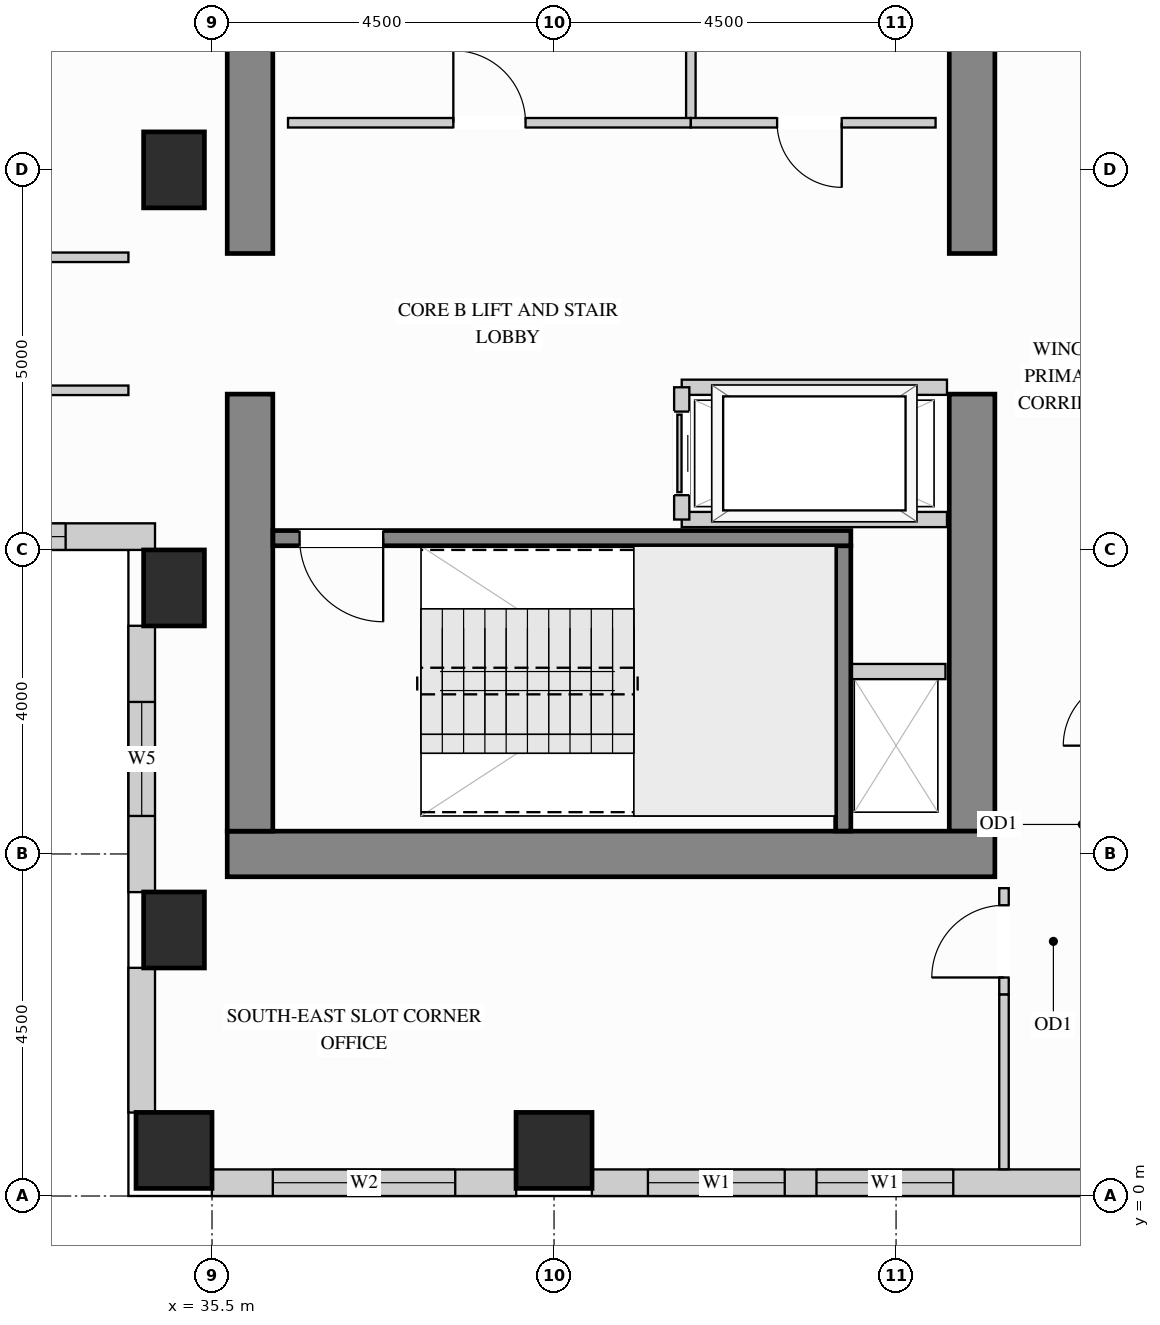
"""IFC4 building model, lengths in metres.
Left out: names, types, materials, properties, quantities, classifications, styles, units other than length and angle.
Written with IfcOpenShell. Run it as: python <this file> out.ifc"""

import sys

from ifc_helpers import new_model, si_unit, direction, frame, frame_2d, origin, origin_2d, place, context, subcontext, project, spatial, rectangle, extrude, source, transform, mapped, element, fill, save


model = new_model("IFC4")
c1 = context("Model", 3, precision=1e-05, world=origin(), true_north=direction((0.0, 1.0)))
c2 = subcontext(c1, "Body", "Model", "MODEL_VIEW")
j1 = project(units=[si_unit("LENGTHUNIT", "METRE"), si_unit("PLANEANGLEUNIT", "RADIAN")], contexts=[c1])
p1 = place(None, origin())
s1 = spatial("IfcSite", under=j1, at=p1, CompositionType="ELEMENT")
p2 = place(p1, origin())
s2 = spatial("IfcBuilding", under=s1, at=p2, CompositionType="ELEMENT")
p3 = place(p2, frame((0.0, 0.0, 197.1)))
s3 = spatial("IfcBuildingStorey", under=s2, at=p3, CompositionType="ELEMENT", Elevation=197.1)
m1 = source(origin(), c2, "Body", "SweptSolid", [
    extrude(rectangle(XDim=0.8, YDim=1.0, at=origin_2d()), origin(), (0.0, 0.0, 1.0), 3.4),
])
for number, where, z_axis, x_axis in (
    (1, (35.0, 13.5, 0.0), (0.0, 0.0, 1.0), (1.0, 0.0, 0.0)),
    (2, (35.0, 3.5, 0.0), (0.0, 0.0, 1.0), (1.0, 0.0, 0.0)),
    (3, (35.0, 8.0, 0.0), (0.0, 0.0, 1.0), (1.0, 0.0, 0.0)),
):
    element("IfcColumn", number, at=place(p3, frame(where, z_axis=z_axis, x_axis=x_axis)), inside=s3, PredefinedType="COLUMN", context=c2, shape_type="MappedRepresentation", body=[
        mapped(m1, transform((0.0, 0.0, 0.0), x_axis=(1.0, 0.0, 0.0), y_axis=(0.0, 1.0, 0.0), z_axis=(0.0, 0.0, 1.0))),
    ])
m2 = source(origin(), c2, "Body", "SweptSolid", [
    extrude(rectangle(XDim=1.0, YDim=1.0, at=origin_2d()), origin(), (0.0, 0.0, 1.0), 3.4),
])
for number, where, z_axis, x_axis in (
    (4, (35.0, 0.6, 0.0), (0.0, 0.0, 1.0), (1.0, 0.0, 0.0)),
    (5, (40.0, 0.6, 0.0), (0.0, 0.0, 1.0), (1.0, 0.0, 0.0)),
):
    element("IfcColumn", number, at=place(p3, frame(where, z_axis=z_axis, x_axis=x_axis)), inside=s3, PredefinedType="COLUMN", context=c2, shape_type="MappedRepresentation", body=[
        mapped(m2, transform((0.0, 0.0, 0.0), x_axis=(1.0, 0.0, 0.0), y_axis=(0.0, 1.0, 0.0), z_axis=(0.0, 0.0, 1.0))),
    ])
m3 = source(origin(), c2, "Body", "SweptSolid", [
    extrude(rectangle(XDim=5.75, YDim=0.6, at=frame_2d((2.875, 0.0))), origin(), (0.0, 0.0, 1.0), 3.4),
])
p4 = place(p3, frame((45.5, 4.8, 0.0), z_axis=(0.0, 0.0, 1.0), x_axis=(0.0, 1.0, 0.0)))
e6 = element("IfcWall", 6, at=p4, inside=s3, PredefinedType="SHEAR", context=c2, shape_type="MappedRepresentation", body=[
    mapped(m3, transform((0.0, 0.0, 0.0), x_axis=(1.0, 0.0, 0.0), y_axis=(0.0, 1.0, 0.0), z_axis=(0.0, 0.0, 1.0))),
])
m4 = source(origin(), c2, "Body", "SweptSolid", [
    extrude(rectangle(XDim=3.8, YDim=0.6, at=frame_2d((1.9, 0.0))), origin(), (0.0, 0.0, 1.0), 3.4),
])
p5 = place(p3, frame((45.5, 12.4, 0.0), z_axis=(0.0, 0.0, 1.0), x_axis=(0.0, 1.0, 0.0)))
e7 = element("IfcWall", 7, at=p5, inside=s3, PredefinedType="SHEAR", context=c2, shape_type="MappedRepresentation", body=[
    mapped(m4, transform((0.0, 0.0, 0.0), x_axis=(1.0, 0.0, 0.0), y_axis=(0.0, 1.0, 0.0), z_axis=(0.0, 0.0, 1.0))),
])
m5 = source(origin(), c2, "Body", "SweptSolid", [
    extrude(rectangle(XDim=10.1, YDim=0.6, at=frame_2d((5.05, 0.0))), origin(), (0.0, 0.0, 1.0), 3.4),
])
p6 = place(p3, frame((35.7, 4.5, 0.0), z_axis=(0.0, 0.0, 1.0), x_axis=(1.0, 0.0, 0.0)))
e8 = element("IfcWall", 8, at=p6, inside=s3, PredefinedType="SHEAR", context=c2, shape_type="MappedRepresentation", body=[
    mapped(m5, transform((0.0, 0.0, 0.0), x_axis=(1.0, 0.0, 0.0), y_axis=(0.0, 1.0, 0.0), z_axis=(0.0, 0.0, 1.0))),
])
p7 = place(p3, frame((36.0, 4.8, 0.0), z_axis=(0.0, 0.0, 1.0), x_axis=(0.0, 1.0, 0.0)))
e9 = element("IfcWall", 9, at=p7, inside=s3, PredefinedType="SHEAR", context=c2, shape_type="MappedRepresentation", body=[
    mapped(m3, transform((0.0, 0.0, 0.0), x_axis=(1.0, 0.0, 0.0), y_axis=(0.0, 1.0, 0.0), z_axis=(0.0, 0.0, 1.0))),
])
p8 = place(p3, frame((36.0, 12.4, 0.0), z_axis=(0.0, 0.0, 1.0), x_axis=(0.0, 1.0, 0.0)))
e10 = element("IfcWall", 10, at=p8, inside=s3, PredefinedType="SHEAR", context=c2, shape_type="MappedRepresentation", body=[
    mapped(m4, transform((0.0, 0.0, 0.0), x_axis=(1.0, 0.0, 0.0), y_axis=(0.0, 1.0, 0.0), z_axis=(0.0, 0.0, 1.0))),
])
p9 = place(p3, frame((30.898, 8.675, 0.0), z_axis=(0.0, 0.0, 1.0), x_axis=(1.0, 0.0, 0.0)))
e11 = element("IfcWall", 11, at=p9, inside=s3, PredefinedType="SOLIDWALL", context=c2, shape_type="SweptSolid", body=[
    extrude(rectangle(XDim=3.852, YDim=0.35, at=frame_2d((1.926, 0.0))), origin(), (0.0, 0.0, 1.0), 3.385),
])
p10 = place(p9, frame((1.176, 0.0, 0.78)))
e12 = element("IfcOpeningElement", 12, at=p10, cuts=e11, PredefinedType="OPENING", context=c2, shape_type="SweptSolid", body=[
    extrude(rectangle(XDim=1.5, YDim=2.0, at=frame_2d((0.75, 1.0))), frame((0.0, 0.185, 0.0), z_axis=(0.0, -1.0, 0.0), x_axis=(1.0, 0.0, 0.0)), (0.0, 0.0, 1.0), 0.37),
])
p11 = place(p3, frame((34.575, 7.502, 0.0), z_axis=(0.0, 0.0, 1.0), x_axis=(0.0, -1.0, 0.0)))
e13 = element("IfcWall", 13, at=p11, inside=s3, PredefinedType="SOLIDWALL", context=c2, shape_type="SweptSolid", body=[
    extrude(rectangle(XDim=3.504, YDim=0.35, at=frame_2d((1.752, 0.0))), origin(), (0.0, 0.0, 1.0), 2.612),
])
p12 = place(p11, frame((1.002, 0.0, 0.78)))
e14 = element("IfcOpeningElement", 14, at=p12, cuts=e13, PredefinedType="OPENING", context=c2, shape_type="SweptSolid", body=[
    extrude(rectangle(XDim=1.5, YDim=1.652, at=frame_2d((0.75, 0.826))), frame((0.0, 0.185, 0.0), z_axis=(0.0, -1.0, 0.0), x_axis=(1.0, 0.0, 0.0)), (0.0, 0.0, 1.0), 0.37),
])
m6 = source(origin(), c2, "Body", "SweptSolid", [
    extrude(rectangle(XDim=1.904, YDim=0.35, at=frame_2d((0.952, 0.0))), origin(), (0.0, 0.0, 1.0), 2.612),
])
p13 = place(p3, frame((34.575, 3.002, 0.0), z_axis=(0.0, 0.0, 1.0), x_axis=(0.0, -1.0, 0.0)))
e15 = element("IfcWall", 15, at=p13, inside=s3, PredefinedType="SOLIDWALL", context=c2, shape_type="MappedRepresentation", body=[
    mapped(m6, transform((0.0, 0.0, 0.0), x_axis=(1.0, 0.0, 0.0), y_axis=(0.0, 1.0, 0.0), z_axis=(0.0, 0.0, 1.0))),
])
p14 = place(p3, frame((35.498, 0.175, 0.0), z_axis=(0.0, 0.0, 1.0), x_axis=(1.0, 0.0, 0.0)))
e16 = element("IfcWall", 16, at=p14, inside=s3, PredefinedType="SOLIDWALL", context=c2, shape_type="SweptSolid", body=[
    extrude(rectangle(XDim=4.004, YDim=0.35, at=frame_2d((2.002, 0.0))), origin(), (0.0, 0.0, 1.0), 2.612),
])
p15 = place(p14, frame((0.802, 0.0, 0.78)))
e17 = element("IfcOpeningElement", 17, at=p15, cuts=e16, PredefinedType="OPENING", context=c2, shape_type="SweptSolid", body=[
    extrude(rectangle(XDim=2.4, YDim=1.652, at=frame_2d((1.2, 0.826))), frame((0.0, 0.185, 0.0), z_axis=(0.0, -1.0, 0.0), x_axis=(1.0, 0.0, 0.0)), (0.0, 0.0, 1.0), 0.37),
])
p16 = place(p3, frame((40.498, 0.175, 0.0), z_axis=(0.0, 0.0, 1.0), x_axis=(1.0, 0.0, 0.0)))
e18 = element("IfcWall", 18, at=p16, inside=s3, PredefinedType="SOLIDWALL", context=c2, shape_type="SweptSolid", body=[
    extrude(rectangle(XDim=6.604, YDim=0.35, at=frame_2d((3.302, 0.0))), origin(), (0.0, 0.0, 1.0), 2.612),
])
p17 = place(p16, frame((0.737, 0.0, 0.78)))
e19 = element("IfcOpeningElement", 19, at=p17, cuts=e18, PredefinedType="OPENING", context=c2, shape_type="SweptSolid", body=[
    extrude(rectangle(XDim=1.8, YDim=1.652, at=frame_2d((0.9, 0.826))), frame((0.0, 0.185, 0.0), z_axis=(0.0, -1.0, 0.0), x_axis=(1.0, 0.0, 0.0)), (0.0, 0.0, 1.0), 0.37),
])
p18 = place(p16, frame((2.955, 0.0, 0.78)))
e20 = element("IfcOpeningElement", 20, at=p18, cuts=e18, PredefinedType="OPENING", context=c2, shape_type="SweptSolid", body=[
    extrude(rectangle(XDim=1.8, YDim=1.652, at=frame_2d((0.9, 0.826))), frame((0.0, 0.185, 0.0), z_axis=(0.0, -1.0, 0.0), x_axis=(1.0, 0.0, 0.0)), (0.0, 0.0, 1.0), 0.37),
])
m7 = source(origin(), c2, "Body", "SweptSolid", [
    extrude(rectangle(XDim=1.93, YDim=0.125, at=frame_2d((0.965, 0.0))), origin(), (0.0, 0.0, 1.0), 3.385),
])
p19 = place(p3, frame((41.8, 14.12, 0.0), z_axis=(0.0, 0.0, 1.0), x_axis=(0.0, 1.0, 0.0)))
e21 = element("IfcWall", 21, at=p19, inside=s3, PredefinedType="PARTITIONING", context=c2, shape_type="MappedRepresentation", body=[
    mapped(m7, transform((0.0, 0.0, 0.0), x_axis=(1.0, 0.0, 0.0), y_axis=(0.0, 1.0, 0.0), z_axis=(0.0, 0.0, 1.0))),
])
p20 = place(p3, frame((36.5, 14.12, 0.0), z_axis=(0.0, 0.0, 1.0), x_axis=(1.0, 0.0, 0.0)))
e22 = element("IfcWall", 22, at=p20, inside=s3, PredefinedType="PARTITIONING", context=c2, shape_type="SweptSolid", body=[
    extrude(rectangle(XDim=5.3, YDim=0.125, at=frame_2d((2.65, 0.0))), origin(), (0.0, 0.0, 1.0), 3.385),
])
p21 = place(p20, frame((2.175, 0.0, 0.0)))
e23 = element("IfcOpeningElement", 23, at=p21, cuts=e22, PredefinedType="OPENING", context=c2, shape_type="SweptSolid", body=[
    extrude(rectangle(XDim=0.95, YDim=2.15, at=frame_2d((0.475, 1.075))), frame((0.0, 0.073, 0.0), z_axis=(0.0, -1.0, 0.0), x_axis=(1.0, 0.0, 0.0)), (0.0, 0.0, 1.0), 0.145),
])
p22 = place(p3, frame((41.8, 14.12, 0.0), z_axis=(0.0, 0.0, 1.0), x_axis=(1.0, 0.0, 0.0)))
e24 = element("IfcWall", 24, at=p22, inside=s3, PredefinedType="PARTITIONING", context=c2, shape_type="SweptSolid", body=[
    extrude(rectangle(XDim=3.22, YDim=0.125, at=frame_2d((1.61, 0.0))), origin(), (0.0, 0.0, 1.0), 3.385),
])
p23 = place(p22, frame((1.135, 0.0, 0.0)))
e25 = element("IfcOpeningElement", 25, at=p23, cuts=e24, PredefinedType="OPENING", context=c2, shape_type="SweptSolid", body=[
    extrude(rectangle(XDim=0.85, YDim=2.1, at=frame_2d((0.425, 1.05))), frame((0.0, 0.073, 0.0), z_axis=(0.0, -1.0, 0.0), x_axis=(1.0, 0.0, 0.0)), (0.0, 0.0, 1.0), 0.145),
])
p24 = place(p3, frame((45.92, 2.65, 0.0), z_axis=(0.0, 0.0, 1.0), x_axis=(0.0, 1.0, 0.0)))
e26 = element("IfcWall", 26, at=p24, inside=s3, PredefinedType="PARTITIONING", context=c2, shape_type="SweptSolid", body=[
    extrude(rectangle(XDim=1.4, YDim=0.125, at=frame_2d((0.7, 0.0))), origin(), (0.0, 0.0, 1.0), 3.385),
])
p25 = place(p24, frame((0.225, 0.0, 0.0)))
e27 = element("IfcOpeningElement", 27, at=p25, cuts=e26, PredefinedType="OPENING", context=c2, shape_type="SweptSolid", body=[
    extrude(rectangle(XDim=0.95, YDim=2.15, at=frame_2d((0.475, 1.075))), frame((0.0, 0.073, 0.0), z_axis=(0.0, -1.0, 0.0), x_axis=(1.0, 0.0, 0.0)), (0.0, 0.0, 1.0), 0.145),
])
m8 = source(origin(), c2, "Body", "SweptSolid", [
    extrude(rectangle(XDim=2.298, YDim=0.125, at=frame_2d((1.149, 0.0))), origin(), (0.0, 0.0, 1.0), 3.385),
])
p26 = place(p3, frame((45.92, 0.352, 0.0), z_axis=(0.0, 0.0, 1.0), x_axis=(0.0, 1.0, 0.0)))
e28 = element("IfcWall", 28, at=p26, inside=s3, PredefinedType="PARTITIONING", context=c2, shape_type="MappedRepresentation", body=[
    mapped(m8, transform((0.0, 0.0, 0.0), x_axis=(1.0, 0.0, 0.0), y_axis=(0.0, 1.0, 0.0), z_axis=(0.0, 0.0, 1.0))),
])
p27 = place(p3, frame((29.85, 12.35, 0.0), z_axis=(0.0, 0.0, 1.0), x_axis=(1.0, 0.0, 0.0)))
e29 = element("IfcWall", 29, at=p27, inside=s3, PredefinedType="PARTITIONING", context=c2, shape_type="SweptSolid", body=[
    extrude(rectangle(XDim=4.55, YDim=0.125, at=frame_2d((2.275, 0.0))), origin(), (0.0, 0.0, 1.0), 3.385),
])
p28 = place(p27, frame((1.8, 0.0, 0.0)))
e30 = element("IfcOpeningElement", 30, at=p28, cuts=e29, PredefinedType="OPENING", context=c2, shape_type="SweptSolid", body=[
    extrude(rectangle(XDim=0.95, YDim=2.15, at=frame_2d((0.475, 1.075))), frame((0.0, 0.073, 0.0), z_axis=(0.0, -1.0, 0.0), x_axis=(1.0, 0.0, 0.0)), (0.0, 0.0, 1.0), 0.145),
])
p29 = place(p3, frame((26.95, 10.6, 0.0), z_axis=(0.0, 0.0, 1.0), x_axis=(1.0, 0.0, 0.0)))
e31 = element("IfcWall", 31, at=p29, inside=s3, PredefinedType="PARTITIONING", context=c2, shape_type="SweptSolid", body=[
    extrude(rectangle(XDim=7.45, YDim=0.125, at=frame_2d((3.725, 0.0))), origin(), (0.0, 0.0, 1.0), 3.385),
])
p30 = place(p29, frame((4.478, 0.0, 0.0)))
e32 = element("IfcOpeningElement", 32, at=p30, cuts=e31, PredefinedType="OPENING", context=c2, shape_type="SweptSolid", body=[
    extrude(rectangle(XDim=0.95, YDim=2.15, at=frame_2d((0.475, 1.075))), frame((0.0, 0.073, 0.0), z_axis=(0.0, -1.0, 0.0), x_axis=(1.0, 0.0, 0.0)), (0.0, 0.0, 1.0), 0.145),
])
m9 = source(origin(), c2, "Body", "SweptSolid", [
    extrude(rectangle(XDim=1.3, YDim=0.2, at=frame_2d((0.65, 0.0))), origin(), (0.0, 0.0, 1.0), 3.385),
])
p31 = place(p3, frame((43.85, 6.9, 0.0), z_axis=(0.0, 0.0, 1.0), x_axis=(1.0, 0.0, 0.0)))
e33 = element("IfcWall", 33, at=p31, inside=s3, PredefinedType="PARTITIONING", context=c2, shape_type="MappedRepresentation", body=[
    mapped(m9, transform((0.0, 0.0, 0.0), x_axis=(1.0, 0.0, 0.0), y_axis=(0.0, 1.0, 0.0), z_axis=(0.0, 0.0, 1.0))),
])
m10 = source(origin(), c2, "Body", "SweptSolid", [
    extrude(rectangle(XDim=3.49, YDim=0.2, at=frame_2d((1.745, 0.0))), origin(), (0.0, 0.0, 1.0), 3.385),
])
for number, where, z_axis, x_axis in (
    (34, (41.68, 10.64, 0.0), (0.0, 0.0, 1.0), (1.0, 0.0, 0.0)),
    (35, (41.68, 8.9, 0.0), (0.0, 0.0, 1.0), (1.0, 0.0, 0.0)),
):
    element("IfcWall", number, at=place(p3, frame(where, z_axis=z_axis, x_axis=x_axis)), inside=s3, PredefinedType="PARTITIONING", context=c2, shape_type="MappedRepresentation", body=[
        mapped(m10, transform((0.0, 0.0, 0.0), x_axis=(1.0, 0.0, 0.0), y_axis=(0.0, 1.0, 0.0), z_axis=(0.0, 0.0, 1.0))),
    ])
p32 = place(p3, frame((41.68, 8.9, 0.0), z_axis=(0.0, 0.0, 1.0), x_axis=(0.0, 1.0, 0.0)))
e36 = element("IfcWall", 36, at=p32, inside=s3, PredefinedType="PARTITIONING", context=c2, shape_type="SweptSolid", body=[
    extrude(rectangle(XDim=1.74, YDim=0.2, at=frame_2d((0.87, 0.0))), origin(), (0.0, 0.0, 1.0), 3.385),
])
p33 = place(p32, frame((0.32, 0.0, 0.0)))
e37 = element("IfcOpeningElement", 37, at=p33, cuts=e36, PredefinedType="OPENING", context=c2, shape_type="SweptSolid", body=[
    extrude(rectangle(XDim=1.1, YDim=2.2, at=frame_2d((0.55, 1.1))), frame((0.0, 0.11, 0.0), z_axis=(0.0, -1.0, 0.0), x_axis=(1.0, 0.0, 0.0)), (0.0, 0.0, 1.0), 0.22),
])
m11 = source(origin(), c2, "Body", "SweptSolid", [
    extrude(rectangle(XDim=3.753, YDim=0.2, at=frame_2d((1.876, 0.0))), origin(), (0.0, 0.0, 1.0), 3.4),
])
p34 = place(p3, frame((43.805, 4.802, 0.0), z_axis=(0.0, 0.0, 1.0), x_axis=(0.0, 1.0, 0.0)))
e38 = element("IfcWall", 38, at=p34, inside=s3, PredefinedType="SHEAR", context=c2, shape_type="MappedRepresentation", body=[
    mapped(m11, transform((0.0, 0.0, 0.0), x_axis=(1.0, 0.0, 0.0), y_axis=(0.0, 1.0, 0.0), z_axis=(0.0, 0.0, 1.0))),
])
p35 = place(p3, frame((36.302, 8.655, 0.0), z_axis=(0.0, 0.0, 1.0), x_axis=(1.0, 0.0, 0.0)))
e39 = element("IfcWall", 39, at=p35, inside=s3, PredefinedType="SHEAR", context=c2, shape_type="SweptSolid", body=[
    extrude(rectangle(XDim=7.603, YDim=0.2, at=frame_2d((3.802, 0.0))), origin(), (0.0, 0.0, 1.0), 3.4),
])
p36 = place(p35, frame((0.35, 0.0, 0.0)))
e40 = element("IfcOpeningElement", 40, at=p36, cuts=e39, PredefinedType="OPENING", context=c2, shape_type="SweptSolid", body=[
    extrude(rectangle(XDim=1.1, YDim=2.15, at=frame_2d((0.55, 1.075))), frame((0.0, 0.11, 0.0), z_axis=(0.0, -1.0, 0.0), x_axis=(1.0, 0.0, 0.0)), (0.0, 0.0, 1.0), 0.22),
])
m12 = source(origin(), c2, "Body", "SweptSolid", [
    extrude(rectangle(XDim=1.1, YDim=2.2, at=frame_2d((0.55, 1.1))), frame((0.0, 0.025, 0.0), z_axis=(0.0, -1.0, 0.0), x_axis=(1.0, 0.0, 0.0)), (0.0, 0.0, 1.0), 0.05),
])
p37 = place(p33, origin())
e41 = element("IfcDoor", 41, at=p37, inside=s3, OperationType="SLIDING_TO_LEFT", PredefinedType="DOOR", context=c2, shape_type="MappedRepresentation", body=[
    mapped(m12, transform((0.0, 0.0, 0.0), x_axis=(1.0, 0.0, 0.0), y_axis=(0.0, 1.0, 0.0), z_axis=(0.0, 0.0, 1.0))),
])
fill(e37, e41)
m13 = source(origin(), c2, "Body", "SweptSolid", [
    extrude(rectangle(XDim=0.95, YDim=2.15, at=frame_2d((0.475, 1.075))), frame((0.0, 0.025, 0.0), z_axis=(0.0, -1.0, 0.0), x_axis=(1.0, 0.0, 0.0)), (0.0, 0.0, 1.0), 0.05),
])
p38 = place(p21, origin())
e42 = element("IfcDoor", 42, at=p38, inside=s3, OperationType="SINGLE_SWING_LEFT", PredefinedType="DOOR", context=c2, shape_type="MappedRepresentation", body=[
    mapped(m13, transform((0.0, 0.0, 0.0), x_axis=(1.0, 0.0, 0.0), y_axis=(0.0, 1.0, 0.0), z_axis=(0.0, 0.0, 1.0))),
])
fill(e23, e42)
p39 = place(p25, origin())
e43 = element("IfcDoor", 43, at=p39, inside=s3, OperationType="SINGLE_SWING_LEFT", PredefinedType="DOOR", context=c2, shape_type="MappedRepresentation", body=[
    mapped(m13, transform((0.0, 0.0, 0.0), x_axis=(1.0, 0.0, 0.0), y_axis=(0.0, 1.0, 0.0), z_axis=(0.0, 0.0, 1.0))),
])
fill(e27, e43)
m14 = source(origin(), c2, "Body", "SweptSolid", [
    extrude(rectangle(XDim=0.85, YDim=2.1, at=frame_2d((0.425, 1.05))), frame((0.0, 0.025, 0.0), z_axis=(0.0, -1.0, 0.0), x_axis=(1.0, 0.0, 0.0)), (0.0, 0.0, 1.0), 0.05),
])
p40 = place(p23, origin())
e44 = element("IfcDoor", 44, at=p40, inside=s3, OperationType="SINGLE_SWING_RIGHT", PredefinedType="DOOR", context=c2, shape_type="MappedRepresentation", body=[
    mapped(m14, transform((0.0, 0.0, 0.0), x_axis=(1.0, 0.0, 0.0), y_axis=(0.0, 1.0, 0.0), z_axis=(0.0, 0.0, 1.0))),
])
fill(e25, e44)
m15 = source(origin(), c2, "Body", "SweptSolid", [
    extrude(rectangle(XDim=1.1, YDim=2.15, at=frame_2d((0.55, 1.075))), frame((0.0, 0.025, 0.0), z_axis=(0.0, -1.0, 0.0), x_axis=(1.0, 0.0, 0.0)), (0.0, 0.0, 1.0), 0.05),
])
p41 = place(p36, origin())
e45 = element("IfcDoor", 45, at=p41, inside=s3, OperationType="SINGLE_SWING_RIGHT", PredefinedType="DOOR", context=c2, shape_type="MappedRepresentation", body=[
    mapped(m15, transform((0.0, 0.0, 0.0), x_axis=(1.0, 0.0, 0.0), y_axis=(0.0, 1.0, 0.0), z_axis=(0.0, 0.0, 1.0))),
])
fill(e40, e45)
m16 = source(origin(), c2, "Body", "SweptSolid", [
    extrude(rectangle(XDim=1.8, YDim=1.652, at=frame_2d((0.9, 0.826))), frame((0.0, 0.03, 0.0), z_axis=(0.0, -1.0, 0.0), x_axis=(1.0, 0.0, 0.0)), (0.0, 0.0, 1.0), 0.06),
])
p42 = place(p17, origin())
e46 = element("IfcWindow", 46, at=p42, inside=s3, PartitioningType="SINGLE_PANEL", PredefinedType="WINDOW", context=c2, shape_type="MappedRepresentation", body=[
    mapped(m16, transform((0.0, 0.0, 0.0), x_axis=(1.0, 0.0, 0.0), y_axis=(0.0, 1.0, 0.0), z_axis=(0.0, 0.0, 1.0))),
])
fill(e19, e46)
p43 = place(p18, origin())
e47 = element("IfcWindow", 47, at=p43, inside=s3, PartitioningType="SINGLE_PANEL", PredefinedType="WINDOW", context=c2, shape_type="MappedRepresentation", body=[
    mapped(m16, transform((0.0, 0.0, 0.0), x_axis=(1.0, 0.0, 0.0), y_axis=(0.0, 1.0, 0.0), z_axis=(0.0, 0.0, 1.0))),
])
fill(e20, e47)
m17 = source(origin(), c2, "Body", "SweptSolid", [
    extrude(rectangle(XDim=2.4, YDim=1.652, at=frame_2d((1.2, 0.826))), frame((0.0, 0.03, 0.0), z_axis=(0.0, -1.0, 0.0), x_axis=(1.0, 0.0, 0.0)), (0.0, 0.0, 1.0), 0.06),
])
p44 = place(p15, origin())
e48 = element("IfcWindow", 48, at=p44, inside=s3, PartitioningType="SINGLE_PANEL", PredefinedType="WINDOW", context=c2, shape_type="MappedRepresentation", body=[
    mapped(m17, transform((0.0, 0.0, 0.0), x_axis=(1.0, 0.0, 0.0), y_axis=(0.0, 1.0, 0.0), z_axis=(0.0, 0.0, 1.0))),
])
fill(e17, e48)
m18 = source(origin(), c2, "Body", "SweptSolid", [
    extrude(rectangle(XDim=1.5, YDim=2.0, at=frame_2d((0.75, 1.0))), frame((0.0, 0.03, 0.0), z_axis=(0.0, -1.0, 0.0), x_axis=(1.0, 0.0, 0.0)), (0.0, 0.0, 1.0), 0.06),
])
p45 = place(p10, origin())
e49 = element("IfcWindow", 49, at=p45, inside=s3, PartitioningType="SINGLE_PANEL", PredefinedType="WINDOW", context=c2, shape_type="MappedRepresentation", body=[
    mapped(m18, transform((0.0, 0.0, 0.0), x_axis=(1.0, 0.0, 0.0), y_axis=(0.0, 1.0, 0.0), z_axis=(0.0, 0.0, 1.0))),
])
fill(e12, e49)
m19 = source(origin(), c2, "Body", "SweptSolid", [
    extrude(rectangle(XDim=1.5, YDim=1.652, at=frame_2d((0.75, 0.826))), frame((0.0, 0.03, 0.0), z_axis=(0.0, -1.0, 0.0), x_axis=(1.0, 0.0, 0.0)), (0.0, 0.0, 1.0), 0.06),
])
p46 = place(p12, origin())
e50 = element("IfcWindow", 50, at=p46, inside=s3, PartitioningType="SINGLE_PANEL", PredefinedType="WINDOW", context=c2, shape_type="MappedRepresentation", body=[
    mapped(m19, transform((0.0, 0.0, 0.0), x_axis=(1.0, 0.0, 0.0), y_axis=(0.0, 1.0, 0.0), z_axis=(0.0, 0.0, 1.0))),
])
fill(e14, e50)
save(model, sys.argv[1])
